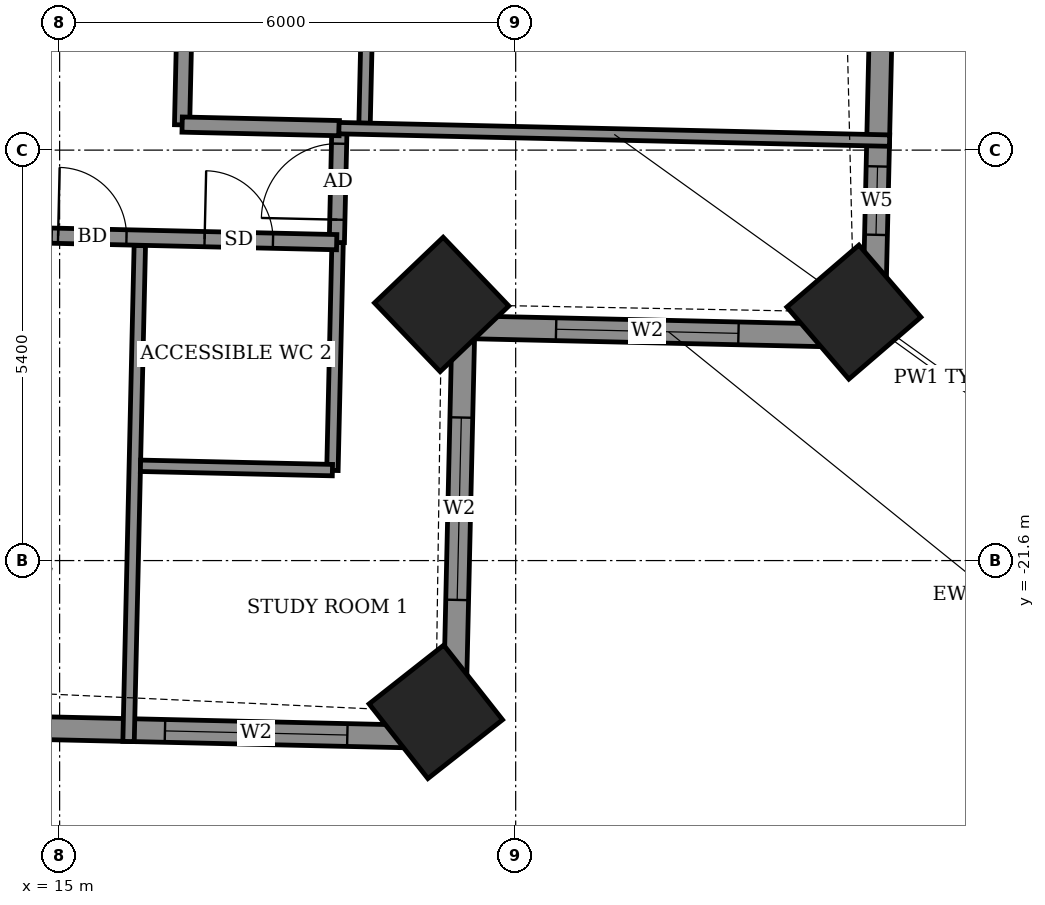
"""IFC4 building model, lengths in metres.
Left out: names, types, materials, properties, quantities, classifications, styles, units other than length and angle.
Written with IfcOpenShell. Run it as: python <this file> out.ifc"""

import sys

from ifc_helpers import new_model, si_unit, direction, frame, frame_2d, origin, origin_2d, place, context, subcontext, project, spatial, rectangle, extrude, element, fill, save


model = new_model("IFC4")
c1 = context("Model", 3, precision=1e-05, world=origin(), true_north=direction((0.0, 1.0)))
c2 = subcontext(c1, "Body", "Model", "MODEL_VIEW")
j1 = project(units=[si_unit("LENGTHUNIT", "METRE"), si_unit("PLANEANGLEUNIT", "RADIAN")], contexts=[c1])
p1 = place(None, origin())
s1 = spatial("IfcSite", under=j1, at=p1, CompositionType="ELEMENT")
p2 = place(p1, origin())
s2 = spatial("IfcBuilding", under=s1, at=p2, CompositionType="ELEMENT")
p3 = place(p2, frame((0.0, 0.0, 156.3)))
s3 = spatial("IfcBuildingStorey", under=s2, at=p3, CompositionType="ELEMENT", Elevation=156.3)
for number, where, z_axis, x_axis in (
    (1, (19.949, -23.59, -0.55), (0.0, 0.0, 1.0), (0.786, 0.619, 0.0)),
    (2, (20.026, -18.23, -0.55), (0.0, 0.0, 1.0), (0.723, 0.691, 0.0)),
    (3, (25.449, -18.331, -0.55), (0.0, 0.0, 1.0), (0.758, 0.652, 0.0)),
):
    element("IfcColumn", number, at=place(p3, frame(where, z_axis=z_axis, x_axis=x_axis)), inside=s3, PredefinedType="COLUMN", context=c2, shape_type="SweptSolid", body=[
        extrude(rectangle(XDim=1.25, YDim=1.25, at=origin_2d()), origin(), (0.0, 0.0, 1.0), 3.6),
    ])
p4 = place(p3, frame((25.71, -18.651, 0.0), z_axis=(0.0, 0.0, 1.0), x_axis=(0.02274444447, 0.999741311663, 0.0)))
e4 = element("IfcWall", 4, at=p4, inside=s3, PredefinedType="SOLIDWALL", context=c2, shape_type="SweptSolid", body=[
    extrude(rectangle(XDim=9.628, YDim=0.3, at=frame_2d((4.814, 0.0))), origin(), (0.0, 0.0, 1.0), 2.55),
])
p5 = place(p4, frame((1.337, 0.0, 0.9)))
e5 = element("IfcOpeningElement", 5, at=p5, cuts=e4, PredefinedType="OPENING", context=c2, shape_type="SweptSolid", body=[
    extrude(rectangle(XDim=0.9, YDim=1.5, at=frame_2d((0.45, 0.75))), frame((0.0, 0.16, 0.0), z_axis=(0.0, -1.0, 0.0), x_axis=(1.0, 0.0, 0.0)), (0.0, 0.0, 1.0), 0.32),
])
p6 = place(p4, frame((5.506, 0.0, 0.0)))
e6 = element("IfcOpeningElement", 6, at=p6, cuts=e4, PredefinedType="OPENING", context=c2, shape_type="SweptSolid", body=[
    extrude(rectangle(XDim=1.2, YDim=2.4, at=frame_2d((0.6, 1.2))), frame((0.0, 0.16, 0.0), z_axis=(0.0, -1.0, 0.0), x_axis=(1.0, 0.0, 0.0)), (0.0, 0.0, 1.0), 0.32),
])
p7 = place(p4, frame((7.537, 0.0, 0.9)))
e7 = element("IfcOpeningElement", 7, at=p7, cuts=e4, PredefinedType="OPENING", context=c2, shape_type="SweptSolid", body=[
    extrude(rectangle(XDim=1.2, YDim=1.5, at=frame_2d((0.6, 0.75))), frame((0.0, 0.16, 0.0), z_axis=(0.0, -1.0, 0.0), x_axis=(1.0, 0.0, 0.0)), (0.0, 0.0, 1.0), 0.32),
])
p8 = place(p3, frame((-18.781, -23.043, 0.0), z_axis=(0.0, 0.0, 1.0), x_axis=(0.999742794992, -0.022679150367, 0.0)))
e8 = element("IfcWall", 8, at=p8, inside=s3, PredefinedType="SOLIDWALL", context=c2, shape_type="SweptSolid", body=[
    extrude(rectangle(XDim=38.98, YDim=0.3, at=frame_2d((19.49, 0.0))), origin(), (0.0, 0.0, 1.0), 3.05),
])
p9 = place(p8, frame((1.94, 0.0, 0.0)))
e9 = element("IfcOpeningElement", 9, at=p9, cuts=e8, PredefinedType="OPENING", context=c2, shape_type="SweptSolid", body=[
    extrude(rectangle(XDim=1.5, YDim=2.4, at=frame_2d((0.75, 1.2))), frame((0.0, 0.16, 0.0), z_axis=(0.0, -1.0, 0.0), x_axis=(1.0, 0.0, 0.0)), (0.0, 0.0, 1.0), 0.32),
])
p10 = place(p8, frame((7.211, 0.0, 0.0)))
e10 = element("IfcOpeningElement", 10, at=p10, cuts=e8, PredefinedType="OPENING", context=c2, shape_type="SweptSolid", body=[
    extrude(rectangle(XDim=1.2, YDim=2.4, at=frame_2d((0.6, 1.2))), frame((0.0, 0.16, 0.0), z_axis=(0.0, -1.0, 0.0), x_axis=(1.0, 0.0, 0.0)), (0.0, 0.0, 1.0), 0.32),
])
p11 = place(p8, frame((9.959, 0.0, 0.0)))
e11 = element("IfcOpeningElement", 11, at=p11, cuts=e8, PredefinedType="OPENING", context=c2, shape_type="SweptSolid", body=[
    extrude(rectangle(XDim=1.5, YDim=2.4, at=frame_2d((0.75, 1.2))), frame((0.0, 0.16, 0.0), z_axis=(0.0, -1.0, 0.0), x_axis=(1.0, 0.0, 0.0)), (0.0, 0.0, 1.0), 0.32),
])
p12 = place(p8, frame((14.659, 0.0, 0.0)))
e12 = element("IfcOpeningElement", 12, at=p12, cuts=e8, PredefinedType="OPENING", context=c2, shape_type="SweptSolid", body=[
    extrude(rectangle(XDim=1.5, YDim=2.4, at=frame_2d((0.75, 1.2))), frame((0.0, 0.16, 0.0), z_axis=(0.0, -1.0, 0.0), x_axis=(1.0, 0.0, 0.0)), (0.0, 0.0, 1.0), 0.32),
])
p13 = place(p8, frame((20.232, 0.0, 0.0)))
e13 = element("IfcOpeningElement", 13, at=p13, cuts=e8, PredefinedType="OPENING", context=c2, shape_type="SweptSolid", body=[
    extrude(rectangle(XDim=1.2, YDim=2.4, at=frame_2d((0.6, 1.2))), frame((0.0, 0.16, 0.0), z_axis=(0.0, -1.0, 0.0), x_axis=(1.0, 0.0, 0.0)), (0.0, 0.0, 1.0), 0.32),
])
p14 = place(p8, frame((22.981, 0.0, 0.0)))
e14 = element("IfcOpeningElement", 14, at=p14, cuts=e8, PredefinedType="OPENING", context=c2, shape_type="SweptSolid", body=[
    extrude(rectangle(XDim=1.5, YDim=2.4, at=frame_2d((0.75, 1.2))), frame((0.0, 0.16, 0.0), z_axis=(0.0, -1.0, 0.0), x_axis=(1.0, 0.0, 0.0)), (0.0, 0.0, 1.0), 0.32),
])
p15 = place(p8, frame((27.681, 0.0, 0.0)))
e15 = element("IfcOpeningElement", 15, at=p15, cuts=e8, PredefinedType="OPENING", context=c2, shape_type="SweptSolid", body=[
    extrude(rectangle(XDim=1.5, YDim=2.4, at=frame_2d((0.75, 1.2))), frame((0.0, 0.16, 0.0), z_axis=(0.0, -1.0, 0.0), x_axis=(1.0, 0.0, 0.0)), (0.0, 0.0, 1.0), 0.32),
])
p16 = place(p8, frame((30.654, 0.0, 0.0)))
e16 = element("IfcOpeningElement", 16, at=p16, cuts=e8, PredefinedType="OPENING", context=c2, shape_type="SweptSolid", body=[
    extrude(rectangle(XDim=1.2, YDim=2.4, at=frame_2d((0.6, 1.2))), frame((0.0, 0.16, 0.0), z_axis=(0.0, -1.0, 0.0), x_axis=(1.0, 0.0, 0.0)), (0.0, 0.0, 1.0), 0.32),
])
p17 = place(p8, frame((35.176, 0.0, 0.9)))
e17 = element("IfcOpeningElement", 17, at=p17, cuts=e8, PredefinedType="OPENING", context=c2, shape_type="SweptSolid", body=[
    extrude(rectangle(XDim=2.4, YDim=1.5, at=frame_2d((1.2, 0.75))), frame((0.0, 0.16, 0.0), z_axis=(0.0, -1.0, 0.0), x_axis=(1.0, 0.0, 0.0)), (0.0, 0.0, 1.0), 0.32),
])
p18 = place(p3, frame((20.189, -23.927, 0.0), z_axis=(0.0, 0.0, 1.0), x_axis=(0.022789195272, 0.999740292565, 0.0)))
e18 = element("IfcWall", 18, at=p18, inside=s3, PredefinedType="SOLIDWALL", context=c2, shape_type="SweptSolid", body=[
    extrude(rectangle(XDim=5.399, YDim=0.3, at=frame_2d((2.7, 0.0))), origin(), (0.0, 0.0, 1.0), 2.55),
])
p19 = place(p18, frame((1.81, 0.0, 0.9)))
e19 = element("IfcOpeningElement", 19, at=p19, cuts=e18, PredefinedType="OPENING", context=c2, shape_type="SweptSolid", body=[
    extrude(rectangle(XDim=2.4, YDim=1.5, at=frame_2d((1.2, 0.75))), frame((0.0, 0.16, 0.0), z_axis=(0.0, -1.0, 0.0), x_axis=(1.0, 0.0, 0.0)), (0.0, 0.0, 1.0), 0.32),
])
p20 = place(p3, frame((20.312, -18.529, 0.0), z_axis=(0.0, 0.0, 1.0), x_axis=(0.999745417973, -0.02256322766, 0.0)))
e20 = element("IfcWall", 20, at=p20, inside=s3, PredefinedType="SOLIDWALL", context=c2, shape_type="SweptSolid", body=[
    extrude(rectangle(XDim=5.399, YDim=0.3, at=frame_2d((2.7, 0.0))), origin(), (0.0, 0.0, 1.0), 2.55),
])
p21 = place(p20, frame((1.22, 0.0, 0.9)))
e21 = element("IfcOpeningElement", 21, at=p21, cuts=e20, PredefinedType="OPENING", context=c2, shape_type="SweptSolid", body=[
    extrude(rectangle(XDim=2.4, YDim=1.5, at=frame_2d((1.2, 0.75))), frame((0.0, 0.16, 0.0), z_axis=(0.0, -1.0, 0.0), x_axis=(1.0, 0.0, 0.0)), (0.0, 0.0, 1.0), 0.32),
])
p22 = place(p3, frame((15.907, -23.98, 0.0), z_axis=(0.0, 0.0, 1.0), x_axis=(0.022672114006, 0.999742954587, 0.0)))
e22 = element("IfcWall", 22, at=p22, inside=s3, PredefinedType="PARTITIONING", context=c2, shape_type="SweptSolid", body=[
    extrude(rectangle(XDim=6.526, YDim=0.15, at=frame_2d((3.263, 0.0))), origin(), (0.0, 0.0, 1.0), 2.55),
])
p23 = place(p3, frame((18.589, -20.414, 0.0), z_axis=(0.0, 0.0, 1.0), x_axis=(0.022625271604, 0.999744015778, 0.0)))
e23 = element("IfcWall", 23, at=p23, inside=s3, PredefinedType="PARTITIONING", context=c2, shape_type="SweptSolid", body=[
    extrude(rectangle(XDim=3.0, YDim=0.15, at=frame_2d((1.5, 0.0))), origin(), (0.0, 0.0, 1.0), 3.05),
])
p24 = place(p3, frame((16.064, -20.353, 0.0), z_axis=(0.0, 0.0, 1.0), x_axis=(0.999746356616, -0.022521599255, 0.0)))
e24 = element("IfcWall", 24, at=p24, inside=s3, PredefinedType="PARTITIONING", context=c2, shape_type="SweptSolid", body=[
    extrude(rectangle(XDim=2.526, YDim=0.15, at=frame_2d((1.263, 0.0))), origin(), (0.0, 0.0, 1.0), 3.05),
])
p25 = place(p3, frame((18.647, -17.415, 0.0), z_axis=(0.0, 0.0, 1.0), x_axis=(0.022617910375, 0.999744182344, 0.0)))
e25 = element("IfcWall", 25, at=p25, inside=s3, PredefinedType="PARTITIONING", context=c2, shape_type="SweptSolid", body=[
    extrude(rectangle(XDim=1.5, YDim=0.2, at=frame_2d((0.75, 0.0))), origin(), (0.0, 0.0, 1.0), 3.05),
])
p26 = place(p25, frame((0.3, 0.0, 0.0)))
e26 = element("IfcOpeningElement", 26, at=p26, cuts=e25, PredefinedType="OPENING", context=c2, shape_type="SweptSolid", body=[
    extrude(rectangle(XDim=1.0, YDim=2.1, at=frame_2d((0.5, 1.05))), frame((0.0, 0.11, 0.0), z_axis=(0.0, -1.0, 0.0), x_axis=(1.0, 0.0, 0.0)), (0.0, 0.0, 1.0), 0.22),
])
p27 = place(p3, frame((14.88, -17.325, 0.0), z_axis=(0.0, 0.0, 1.0), x_axis=(0.999739622, -0.022818593369, 0.0)))
e27 = element("IfcWall", 27, at=p27, inside=s3, PredefinedType="PARTITIONING", context=c2, shape_type="SweptSolid", body=[
    extrude(rectangle(XDim=3.766, YDim=0.2, at=frame_2d((1.883, 0.0))), origin(), (0.0, 0.0, 1.0), 3.05),
])
p28 = place(p27, frame((0.1, 0.0, 0.0)))
e28 = element("IfcOpeningElement", 28, at=p28, cuts=e27, PredefinedType="OPENING", context=c2, shape_type="SweptSolid", body=[
    extrude(rectangle(XDim=0.9, YDim=2.1, at=frame_2d((0.45, 1.05))), frame((0.0, 0.11, 0.0), z_axis=(0.0, -1.0, 0.0), x_axis=(1.0, 0.0, 0.0)), (0.0, 0.0, 1.0), 0.22),
])
p29 = place(p27, frame((2.028, 0.0, 0.0)))
e29 = element("IfcOpeningElement", 29, at=p29, cuts=e27, PredefinedType="OPENING", context=c2, shape_type="SweptSolid", body=[
    extrude(rectangle(XDim=0.9, YDim=2.1, at=frame_2d((0.45, 1.05))), frame((0.0, 0.11, 0.0), z_axis=(0.0, -1.0, 0.0), x_axis=(1.0, 0.0, 0.0)), (0.0, 0.0, 1.0), 0.22),
])
p30 = place(p3, frame((16.611, -15.868, 0.0), z_axis=(0.0, 0.0, 1.0), x_axis=(0.022698399288, 0.999742358145, 0.0)))
e30 = element("IfcWall", 30, at=p30, inside=s3, PredefinedType="PARTITIONING", context=c2, shape_type="SweptSolid", body=[
    extrude(rectangle(XDim=8.196, YDim=0.2, at=frame_2d((4.098, 0.0))), origin(), (0.0, 0.0, 1.0), 3.05),
])
p31 = place(p30, frame((3.025, 0.0, 0.0)))
e31 = element("IfcOpeningElement", 31, at=p31, cuts=e30, PredefinedType="OPENING", context=c2, shape_type="SweptSolid", body=[
    extrude(rectangle(XDim=0.9, YDim=2.1, at=frame_2d((0.45, 1.05))), frame((0.0, 0.11, 0.0), z_axis=(0.0, -1.0, 0.0), x_axis=(1.0, 0.0, 0.0)), (0.0, 0.0, 1.0), 0.22),
])
p32 = place(p30, frame((5.786, 0.0, 0.0)))
e32 = element("IfcOpeningElement", 32, at=p32, cuts=e30, PredefinedType="OPENING", context=c2, shape_type="SweptSolid", body=[
    extrude(rectangle(XDim=1.0, YDim=2.1, at=frame_2d((0.5, 1.05))), frame((0.0, 0.11, 0.0), z_axis=(0.0, -1.0, 0.0), x_axis=(1.0, 0.0, 0.0)), (0.0, 0.0, 1.0), 0.22),
])
p33 = place(p3, frame((19.012, -15.848, 0.0), z_axis=(0.0, 0.0, 1.0), x_axis=(0.022781023197, 0.999740478815, 0.0)))
e33 = element("IfcWall", 33, at=p33, inside=s3, PredefinedType="PARTITIONING", context=c2, shape_type="SweptSolid", body=[
    extrude(rectangle(XDim=2.325, YDim=0.15, at=frame_2d((1.163, 0.0))), origin(), (0.0, 0.0, 1.0), 3.05),
])
p34 = place(p3, frame((16.612, -15.864, 0.0), z_axis=(0.0, 0.0, 1.0), x_axis=(0.999742931749, -0.02267312106, 0.0)))
e34 = element("IfcWall", 34, at=p34, inside=s3, PredefinedType="PARTITIONING", context=c2, shape_type="SweptSolid", body=[
    extrude(rectangle(XDim=2.067, YDim=0.2, at=frame_2d((1.034, 0.0))), origin(), (0.0, 0.0, 1.0), 3.05),
])
p35 = place(p3, frame((18.675, -15.911, 0.0), z_axis=(0.0, 0.0, 1.0), x_axis=(0.999743624132, -0.022642570706, 0.0)))
e35 = element("IfcWall", 35, at=p35, inside=s3, PredefinedType="PARTITIONING", context=c2, shape_type="SweptSolid", body=[
    extrude(rectangle(XDim=7.246, YDim=0.15, at=frame_2d((3.623, 0.0))), origin(), (0.0, 0.0, 1.0), 2.55),
])
p36 = place(p5, origin())
e36 = element("IfcWindow", 36, at=p36, inside=s3, PartitioningType="SINGLE_PANEL", PredefinedType="WINDOW", context=c2, shape_type="SweptSolid", body=[
    extrude(rectangle(XDim=0.9, YDim=1.5, at=frame_2d((0.45, 0.75))), frame((0.0, 0.03, 0.0), z_axis=(0.0, -1.0, 0.0), x_axis=(1.0, 0.0, 0.0)), (0.0, 0.0, 1.0), 0.06),
])
fill(e5, e36)
p37 = place(p17, origin())
e37 = element("IfcWindow", 37, at=p37, inside=s3, PartitioningType="DOUBLE_PANEL_VERTICAL", PredefinedType="WINDOW", context=c2, shape_type="SweptSolid", body=[
    extrude(rectangle(XDim=2.4, YDim=1.5, at=frame_2d((1.2, 0.75))), frame((0.0, 0.03, 0.0), z_axis=(0.0, -1.0, 0.0), x_axis=(1.0, 0.0, 0.0)), (0.0, 0.0, 1.0), 0.06),
])
fill(e17, e37)
p38 = place(p19, origin())
e38 = element("IfcWindow", 38, at=p38, inside=s3, PartitioningType="DOUBLE_PANEL_VERTICAL", PredefinedType="WINDOW", context=c2, shape_type="SweptSolid", body=[
    extrude(rectangle(XDim=2.4, YDim=1.5, at=frame_2d((1.2, 0.75))), frame((0.0, 0.03, 0.0), z_axis=(0.0, -1.0, 0.0), x_axis=(1.0, 0.0, 0.0)), (0.0, 0.0, 1.0), 0.06),
])
fill(e19, e38)
p39 = place(p21, origin())
e39 = element("IfcWindow", 39, at=p39, inside=s3, PartitioningType="DOUBLE_PANEL_VERTICAL", PredefinedType="WINDOW", context=c2, shape_type="SweptSolid", body=[
    extrude(rectangle(XDim=2.4, YDim=1.5, at=frame_2d((1.2, 0.75))), frame((0.0, 0.03, 0.0), z_axis=(0.0, -1.0, 0.0), x_axis=(1.0, 0.0, 0.0)), (0.0, 0.0, 1.0), 0.06),
])
fill(e21, e39)
p40 = place(p28, origin())
e40 = element("IfcDoor", 40, at=p40, inside=s3, OperationType="SINGLE_SWING_LEFT", PredefinedType="DOOR", context=c2, shape_type="SweptSolid", body=[
    extrude(rectangle(XDim=0.9, YDim=2.1, at=frame_2d((0.45, 1.05))), frame((0.0, 0.025, 0.0), z_axis=(0.0, -1.0, 0.0), x_axis=(1.0, 0.0, 0.0)), (0.0, 0.0, 1.0), 0.05),
])
fill(e28, e40)
p41 = place(p26, origin())
e41 = element("IfcDoor", 41, at=p41, inside=s3, OperationType="SINGLE_SWING_RIGHT", PredefinedType="DOOR", context=c2, shape_type="SweptSolid", body=[
    extrude(rectangle(XDim=1.0, YDim=2.1, at=frame_2d((0.5, 1.05))), frame((0.0, 0.025, 0.0), z_axis=(0.0, -1.0, 0.0), x_axis=(1.0, 0.0, 0.0)), (0.0, 0.0, 1.0), 0.05),
])
fill(e26, e41)
p42 = place(p29, origin())
e42 = element("IfcDoor", 42, at=p42, inside=s3, OperationType="SINGLE_SWING_RIGHT", PredefinedType="DOOR", context=c2, shape_type="SweptSolid", body=[
    extrude(rectangle(XDim=0.9, YDim=2.1, at=frame_2d((0.45, 1.05))), frame((0.0, 0.025, 0.0), z_axis=(0.0, -1.0, 0.0), x_axis=(1.0, 0.0, 0.0)), (0.0, 0.0, 1.0), 0.05),
])
fill(e29, e42)
save(model, sys.argv[1])
